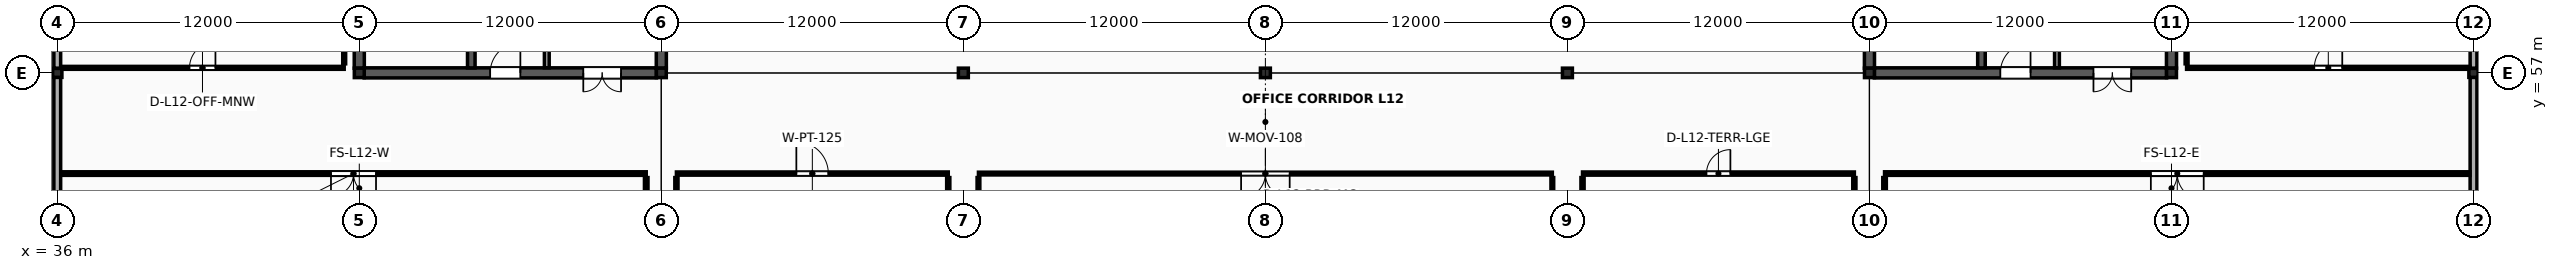
"""IFC4 building model, lengths in metres.
Left out: names, types, materials, properties, quantities, classifications, styles, units other than length and angle.
Written with IfcOpenShell. Run it as: python <this file> out.ifc"""

import sys

from ifc_helpers import new_model, si_unit, direction, frame, frame_2d, origin, origin_2d, place, context, subcontext, project, spatial, rectangle, i_section, extrude, element, fill, save


model = new_model("IFC4")
c1 = context("Model", 3, precision=1e-05, world=origin(), true_north=direction((0.0, 1.0)))
c2 = subcontext(c1, "Body", "Model", "MODEL_VIEW")
j1 = project(units=[si_unit("LENGTHUNIT", "METRE"), si_unit("PLANEANGLEUNIT", "RADIAN")], contexts=[c1])
p1 = place(None, origin())
s1 = spatial("IfcSite", under=j1, at=p1, CompositionType="ELEMENT")
p2 = place(p1, origin())
s2 = spatial("IfcBuilding", under=s1, at=p2, CompositionType="ELEMENT")
p3 = place(p2, frame((0.0, 0.0, 49.6)))
s3 = spatial("IfcBuildingStorey", under=s2, at=p3, CompositionType="ELEMENT", Elevation=49.6)
p4 = place(p3, frame((36.0, 57.0, 0.0), z_axis=(0.0, 0.0, 1.0), x_axis=(1.0, 0.0, 0.0)))
e1 = element("IfcColumn", 1, at=p4, inside=s3, PredefinedType="COLUMN", context=c2, shape_type="SweptSolid", body=[
    extrude(i_section(OverallWidth=0.369, OverallDepth=0.356, WebThickness=0.011, FlangeThickness=0.018, FilletRadius=0.018, at=origin_2d()), origin(), (0.0, 0.0, 1.0), 4.0),
])
for number, where, z_axis, x_axis in (
    (2, (48.0, 57.0, 0.0), (0.0, 0.0, 1.0), (1.0, 0.0, 0.0)),
    (3, (60.0, 57.0, 0.0), (0.0, 0.0, 1.0), (1.0, 0.0, 0.0)),
    (4, (72.0, 57.0, 0.0), (0.0, 0.0, 1.0), (1.0, 0.0, 0.0)),
    (5, (84.0, 57.0, 0.0), (0.0, 0.0, 1.0), (1.0, 0.0, 0.0)),
    (6, (96.0, 57.0, 0.0), (0.0, 0.0, 1.0), (1.0, 0.0, 0.0)),
    (7, (108.0, 57.0, 0.0), (0.0, 0.0, 1.0), (1.0, 0.0, 0.0)),
    (8, (120.0, 57.0, 0.0), (0.0, 0.0, 1.0), (1.0, 0.0, 0.0)),
):
    element("IfcColumn", number, at=place(p3, frame(where, z_axis=z_axis, x_axis=x_axis)), inside=s3, PredefinedType="COLUMN", context=c2, shape_type="SweptSolid", body=[
        extrude(i_section(OverallWidth=0.394, OverallDepth=0.375, WebThickness=0.017, FlangeThickness=0.028, FilletRadius=0.018, at=origin_2d()), origin(), (0.0, 0.0, 1.0), 4.0),
    ])
p5 = place(p3, frame((132.0, 57.0, 0.0), z_axis=(0.0, 0.0, 1.0), x_axis=(1.0, 0.0, 0.0)))
e9 = element("IfcColumn", 9, at=p5, inside=s3, PredefinedType="COLUMN", context=c2, shape_type="SweptSolid", body=[
    extrude(i_section(OverallWidth=0.369, OverallDepth=0.356, WebThickness=0.011, FlangeThickness=0.018, FilletRadius=0.018, at=origin_2d()), origin(), (0.0, 0.0, 1.0), 4.0),
])
p6 = place(p3, frame((48.194, 57.0, 0.0), z_axis=(0.0, 0.0, 1.0), x_axis=(1.0, 0.0, 0.0)))
e10 = element("IfcWall", 10, at=p6, inside=s3, PredefinedType="SHEAR", context=c2, shape_type="SweptSolid", body=[
    extrude(rectangle(XDim=11.612, YDim=0.4, at=frame_2d((5.806, 0.0))), origin(), (0.0, 0.0, 1.0), 3.848),
])
p7 = place(p6, frame((5.006, 0.0, 0.0)))
e11 = element("IfcOpeningElement", 11, at=p7, cuts=e10, PredefinedType="OPENING", context=c2, shape_type="SweptSolid", body=[
    extrude(rectangle(XDim=1.2, YDim=2.2, at=frame_2d((0.6, 1.1))), frame((0.0, 0.215, 0.0), z_axis=(0.0, -1.0, 0.0), x_axis=(1.0, 0.0, 0.0)), (0.0, 0.0, 1.0), 0.43),
])
p8 = place(p6, frame((8.706, 0.0, 0.0)))
e12 = element("IfcOpeningElement", 12, at=p8, cuts=e10, PredefinedType="OPENING", context=c2, shape_type="SweptSolid", body=[
    extrude(rectangle(XDim=1.5, YDim=2.25, at=frame_2d((0.75, 1.125))), frame((0.0, 0.215, 0.0), z_axis=(0.0, -1.0, 0.0), x_axis=(1.0, 0.0, 0.0)), (0.0, 0.0, 1.0), 0.43),
])
for number, where, z_axis, x_axis in (
    (13, (48.0, 57.185, 0.0), (0.0, 0.0, 1.0), (0.0, 1.0, 0.0)),
    (14, (60.0, 57.185, 0.0), (0.0, 0.0, 1.0), (0.0, 1.0, 0.0)),
):
    element("IfcWall", number, at=place(p3, frame(where, z_axis=z_axis, x_axis=x_axis)), inside=s3, PredefinedType="SHEAR", context=c2, shape_type="SweptSolid", body=[
        extrude(rectangle(XDim=11.64, YDim=0.4, at=frame_2d((5.82, 0.0))), origin(), (0.0, 0.0, 1.0), 3.848),
    ])
p9 = place(p3, frame((52.45, 57.197, 0.0), z_axis=(0.0, 0.0, 1.0), x_axis=(0.0, 1.0, 0.0)))
e15 = element("IfcWall", 15, at=p9, inside=s3, PredefinedType="SHEAR", context=c2, shape_type="SweptSolid", body=[
    extrude(rectangle(XDim=11.606, YDim=0.3, at=frame_2d((5.803, 0.0))), origin(), (0.0, 0.0, 1.0), 3.848),
])
p10 = place(p9, frame((0.9, 0.0, 0.0)))
e16 = element("IfcOpeningElement", 16, at=p10, cuts=e15, PredefinedType="OPENING", context=c2, shape_type="SweptSolid", body=[
    extrude(rectangle(XDim=1.1, YDim=2.2, at=frame_2d((0.55, 1.1))), frame((0.0, 0.165, 0.0), z_axis=(0.0, -1.0, 0.0), x_axis=(1.0, 0.0, 0.0)), (0.0, 0.0, 1.0), 0.33),
])
p11 = place(p3, frame((55.45, 57.2, 0.0), z_axis=(0.0, 0.0, 1.0), x_axis=(0.0, 1.0, 0.0)))
e17 = element("IfcWall", 17, at=p11, inside=s3, PredefinedType="SOLIDWALL", context=c2, shape_type="SweptSolid", body=[
    extrude(rectangle(XDim=8.48, YDim=0.19, at=frame_2d((4.24, 0.0))), origin(), (0.0, 0.0, 1.0), 3.838),
])
p12 = place(p11, frame((3.6, 0.0, 0.0)))
e18 = element("IfcOpeningElement", 18, at=p12, cuts=e17, PredefinedType="OPENING", context=c2, shape_type="SweptSolid", body=[
    extrude(rectangle(XDim=1.04, YDim=2.18, at=frame_2d((0.52, 1.09))), frame((0.0, 0.11, 0.0), z_axis=(0.0, -1.0, 0.0), x_axis=(1.0, 0.0, 0.0)), (0.0, 0.0, 1.0), 0.22),
])
p13 = place(p3, frame((108.194, 57.0, 0.0), z_axis=(0.0, 0.0, 1.0), x_axis=(1.0, 0.0, 0.0)))
e19 = element("IfcWall", 19, at=p13, inside=s3, PredefinedType="SHEAR", context=c2, shape_type="SweptSolid", body=[
    extrude(rectangle(XDim=11.612, YDim=0.4, at=frame_2d((5.806, 0.0))), origin(), (0.0, 0.0, 1.0), 3.848),
])
p14 = place(p13, frame((5.006, 0.0, 0.0)))
e20 = element("IfcOpeningElement", 20, at=p14, cuts=e19, PredefinedType="OPENING", context=c2, shape_type="SweptSolid", body=[
    extrude(rectangle(XDim=1.2, YDim=2.2, at=frame_2d((0.6, 1.1))), frame((0.0, 0.215, 0.0), z_axis=(0.0, -1.0, 0.0), x_axis=(1.0, 0.0, 0.0)), (0.0, 0.0, 1.0), 0.43),
])
p15 = place(p13, frame((8.706, 0.0, 0.0)))
e21 = element("IfcOpeningElement", 21, at=p15, cuts=e19, PredefinedType="OPENING", context=c2, shape_type="SweptSolid", body=[
    extrude(rectangle(XDim=1.5, YDim=2.25, at=frame_2d((0.75, 1.125))), frame((0.0, 0.215, 0.0), z_axis=(0.0, -1.0, 0.0), x_axis=(1.0, 0.0, 0.0)), (0.0, 0.0, 1.0), 0.43),
])
for number, where, z_axis, x_axis in (
    (22, (108.0, 57.185, 0.0), (0.0, 0.0, 1.0), (0.0, 1.0, 0.0)),
    (23, (120.0, 57.185, 0.0), (0.0, 0.0, 1.0), (0.0, 1.0, 0.0)),
):
    element("IfcWall", number, at=place(p3, frame(where, z_axis=z_axis, x_axis=x_axis)), inside=s3, PredefinedType="SHEAR", context=c2, shape_type="SweptSolid", body=[
        extrude(rectangle(XDim=11.64, YDim=0.4, at=frame_2d((5.82, 0.0))), origin(), (0.0, 0.0, 1.0), 3.848),
    ])
p16 = place(p3, frame((112.45, 57.197, 0.0), z_axis=(0.0, 0.0, 1.0), x_axis=(0.0, 1.0, 0.0)))
e24 = element("IfcWall", 24, at=p16, inside=s3, PredefinedType="SHEAR", context=c2, shape_type="SweptSolid", body=[
    extrude(rectangle(XDim=11.606, YDim=0.3, at=frame_2d((5.803, 0.0))), origin(), (0.0, 0.0, 1.0), 3.848),
])
p17 = place(p16, frame((0.9, 0.0, 0.0)))
e25 = element("IfcOpeningElement", 25, at=p17, cuts=e24, PredefinedType="OPENING", context=c2, shape_type="SweptSolid", body=[
    extrude(rectangle(XDim=1.1, YDim=2.2, at=frame_2d((0.55, 1.1))), frame((0.0, 0.165, 0.0), z_axis=(0.0, -1.0, 0.0), x_axis=(1.0, 0.0, 0.0)), (0.0, 0.0, 1.0), 0.33),
])
p18 = place(p3, frame((115.45, 57.2, 0.0), z_axis=(0.0, 0.0, 1.0), x_axis=(0.0, 1.0, 0.0)))
e26 = element("IfcWall", 26, at=p18, inside=s3, PredefinedType="SOLIDWALL", context=c2, shape_type="SweptSolid", body=[
    extrude(rectangle(XDim=8.48, YDim=0.19, at=frame_2d((4.24, 0.0))), origin(), (0.0, 0.0, 1.0), 3.838),
])
p19 = place(p18, frame((3.6, 0.0, 0.0)))
e27 = element("IfcOpeningElement", 27, at=p19, cuts=e26, PredefinedType="OPENING", context=c2, shape_type="SweptSolid", body=[
    extrude(rectangle(XDim=1.04, YDim=2.18, at=frame_2d((0.52, 1.09))), frame((0.0, 0.11, 0.0), z_axis=(0.0, -1.0, 0.0), x_axis=(1.0, 0.0, 0.0)), (0.0, 0.0, 1.0), 0.22),
])
p20 = place(p3, frame((36.0, 45.176, 0.0), z_axis=(0.0, 0.0, 1.0), x_axis=(0.0, 1.0, 0.0)))
e28 = element("IfcWall", 28, at=p20, inside=s3, PredefinedType="SOLIDWALL", context=c2, shape_type="SweptSolid", body=[
    extrude(rectangle(XDim=11.648, YDim=0.27, at=frame_2d((5.824, 0.0))), origin(), (0.0, 0.0, 1.0), 3.301),
])
p21 = place(p20, frame((4.904, 0.0, 0.78)))
e29 = element("IfcOpeningElement", 29, at=p21, cuts=e28, PredefinedType="OPENING", context=c2, shape_type="SweptSolid", body=[
    extrude(rectangle(XDim=1.84, YDim=1.42, at=frame_2d((0.92, 0.71))), frame((0.0, 0.15, 0.0), z_axis=(0.0, -1.0, 0.0), x_axis=(1.0, 0.0, 0.0)), (0.0, 0.0, 1.0), 0.3),
])
p22 = place(p3, frame((36.0, 57.176, 0.0), z_axis=(0.0, 0.0, 1.0), x_axis=(0.0, 1.0, 0.0)))
e30 = element("IfcWall", 30, at=p22, inside=s3, PredefinedType="SOLIDWALL", context=c2, shape_type="SweptSolid", body=[
    extrude(rectangle(XDim=11.648, YDim=0.27, at=frame_2d((5.824, 0.0))), origin(), (0.0, 0.0, 1.0), 3.301),
])
p23 = place(p22, frame((4.824, 0.0, 0.78)))
e31 = element("IfcOpeningElement", 31, at=p23, cuts=e30, PredefinedType="OPENING", context=c2, shape_type="SweptSolid", body=[
    extrude(rectangle(XDim=2.0, YDim=1.42, at=frame_2d((1.0, 0.71))), frame((0.0, 0.15, 0.0), z_axis=(0.0, -1.0, 0.0), x_axis=(1.0, 0.0, 0.0)), (0.0, 0.0, 1.0), 0.3),
])
p24 = place(p3, frame((132.0, 45.176, 0.0), z_axis=(0.0, 0.0, 1.0), x_axis=(0.0, 1.0, 0.0)))
e32 = element("IfcWall", 32, at=p24, inside=s3, PredefinedType="SOLIDWALL", context=c2, shape_type="SweptSolid", body=[
    extrude(rectangle(XDim=11.648, YDim=0.27, at=frame_2d((5.824, 0.0))), origin(), (0.0, 0.0, 1.0), 3.301),
])
p25 = place(p24, frame((4.744, 0.0, 0.78)))
e33 = element("IfcOpeningElement", 33, at=p25, cuts=e32, PredefinedType="OPENING", context=c2, shape_type="SweptSolid", body=[
    extrude(rectangle(XDim=2.16, YDim=1.42, at=frame_2d((1.08, 0.71))), frame((0.0, 0.15, 0.0), z_axis=(0.0, -1.0, 0.0), x_axis=(1.0, 0.0, 0.0)), (0.0, 0.0, 1.0), 0.3),
])
p26 = place(p3, frame((132.0, 57.176, 0.0), z_axis=(0.0, 0.0, 1.0), x_axis=(0.0, 1.0, 0.0)))
e34 = element("IfcWall", 34, at=p26, inside=s3, PredefinedType="SOLIDWALL", context=c2, shape_type="SweptSolid", body=[
    extrude(rectangle(XDim=11.648, YDim=0.27, at=frame_2d((5.824, 0.0))), origin(), (0.0, 0.0, 1.0), 3.301),
])
p27 = place(p26, frame((4.664, 0.0, 0.78)))
e35 = element("IfcOpeningElement", 35, at=p27, cuts=e34, PredefinedType="OPENING", context=c2, shape_type="SweptSolid", body=[
    extrude(rectangle(XDim=2.32, YDim=1.42, at=frame_2d((1.16, 0.71))), frame((0.0, 0.15, 0.0), z_axis=(0.0, -1.0, 0.0), x_axis=(1.0, 0.0, 0.0)), (0.0, 0.0, 1.0), 0.3),
])
p28 = place(p3, frame((36.14, 53.0, 0.0), z_axis=(0.0, 0.0, 1.0), x_axis=(1.0, 0.0, 0.0)))
e36 = element("IfcWall", 36, at=p28, inside=s3, PredefinedType="PARTITIONING", context=c2, shape_type="SweptSolid", body=[
    extrude(rectangle(XDim=23.26, YDim=0.14, at=frame_2d((11.63, 0.0))), origin(), (0.0, 0.0, 1.0), 2.88),
])
p29 = place(p28, frame((10.735, 0.0, 0.0)))
e37 = element("IfcOpeningElement", 37, at=p29, cuts=e36, PredefinedType="OPENING", context=c2, shape_type="SweptSolid", body=[
    extrude(rectangle(XDim=1.79, YDim=2.39, at=frame_2d((0.895, 1.195))), frame((0.0, 0.085, 0.0), z_axis=(0.0, -1.0, 0.0), x_axis=(1.0, 0.0, 0.0)), (0.0, 0.0, 1.0), 0.17),
])
p30 = place(p3, frame((59.4, 45.14, 0.0), z_axis=(0.0, 0.0, 1.0), x_axis=(0.0, 1.0, 0.0)))
e38 = element("IfcWall", 38, at=p30, inside=s3, PredefinedType="PARTITIONING", context=c2, shape_type="SweptSolid", body=[
    extrude(rectangle(XDim=7.7, YDim=0.14, at=frame_2d((3.85, 0.0))), origin(), (0.0, 0.0, 1.0), 2.88),
])
p31 = place(p3, frame((60.6, 53.0, 0.0), z_axis=(0.0, 0.0, 1.0), x_axis=(1.0, 0.0, 0.0)))
e39 = element("IfcWall", 39, at=p31, inside=s3, PredefinedType="PARTITIONING", context=c2, shape_type="SweptSolid", body=[
    extrude(rectangle(XDim=10.8, YDim=0.125, at=frame_2d((5.4, 0.0))), origin(), (0.0, 0.0, 1.0), 2.88),
])
p32 = place(p31, frame((4.765, 0.0, 0.0)))
e40 = element("IfcOpeningElement", 40, at=p32, cuts=e39, PredefinedType="OPENING", context=c2, shape_type="SweptSolid", body=[
    extrude(rectangle(XDim=1.27, YDim=2.27, at=frame_2d((0.635, 1.135))), frame((0.0, 0.077, 0.0), z_axis=(0.0, -1.0, 0.0), x_axis=(1.0, 0.0, 0.0)), (0.0, 0.0, 1.0), 0.155),
])
for number, where, z_axis, x_axis in (
    (41, (60.6, 45.14, 0.0), (0.0, 0.0, 1.0), (0.0, 1.0, 0.0)),
    (42, (71.4, 45.14, 0.0), (0.0, 0.0, 1.0), (0.0, 1.0, 0.0)),
):
    element("IfcWall", number, at=place(p3, frame(where, z_axis=z_axis, x_axis=x_axis)), inside=s3, PredefinedType="PARTITIONING", context=c2, shape_type="SweptSolid", body=[
        extrude(rectangle(XDim=7.7, YDim=0.125, at=frame_2d((3.85, 0.0))), origin(), (0.0, 0.0, 1.0), 2.88),
    ])
p33 = place(p3, frame((72.6, 53.0, 0.0), z_axis=(0.0, 0.0, 1.0), x_axis=(1.0, 0.0, 0.0)))
e43 = element("IfcWall", 43, at=p33, inside=s3, PredefinedType="MOVABLE", context=c2, shape_type="SweptSolid", body=[
    extrude(rectangle(XDim=22.8, YDim=0.108, at=frame_2d((11.4, 0.0))), origin(), (0.0, 0.0, 1.0), 2.88),
])
p34 = place(p33, frame((10.435, 0.0, 0.0)))
e44 = element("IfcOpeningElement", 44, at=p34, cuts=e43, PredefinedType="OPENING", context=c2, shape_type="SweptSolid", body=[
    extrude(rectangle(XDim=1.93, YDim=2.43, at=frame_2d((0.965, 1.215))), frame((0.0, 0.069, 0.0), z_axis=(0.0, -1.0, 0.0), x_axis=(1.0, 0.0, 0.0)), (0.0, 0.0, 1.0), 0.138),
])
for number, where, z_axis, x_axis in (
    (45, (72.6, 45.14, 0.0), (0.0, 0.0, 1.0), (0.0, 1.0, 0.0)),
    (46, (95.4, 45.14, 0.0), (0.0, 0.0, 1.0), (0.0, 1.0, 0.0)),
):
    element("IfcWall", number, at=place(p3, frame(where, z_axis=z_axis, x_axis=x_axis)), inside=s3, PredefinedType="MOVABLE", context=c2, shape_type="SweptSolid", body=[
        extrude(rectangle(XDim=7.7, YDim=0.108, at=frame_2d((3.85, 0.0))), origin(), (0.0, 0.0, 1.0), 2.88),
    ])
p35 = place(p3, frame((96.6, 53.0, 0.0), z_axis=(0.0, 0.0, 1.0), x_axis=(1.0, 0.0, 0.0)))
e47 = element("IfcWall", 47, at=p35, inside=s3, PredefinedType="PARTITIONING", context=c2, shape_type="SweptSolid", body=[
    extrude(rectangle(XDim=10.8, YDim=0.125, at=frame_2d((5.4, 0.0))), origin(), (0.0, 0.0, 1.0), 2.88),
])
p36 = place(p35, frame((4.925, 0.0, 0.0)))
e48 = element("IfcOpeningElement", 48, at=p36, cuts=e47, PredefinedType="OPENING", context=c2, shape_type="SweptSolid", body=[
    extrude(rectangle(XDim=0.95, YDim=2.13, at=frame_2d((0.475, 1.065))), frame((0.0, 0.077, 0.0), z_axis=(0.0, -1.0, 0.0), x_axis=(1.0, 0.0, 0.0)), (0.0, 0.0, 1.0), 0.155),
])
for number, where, z_axis, x_axis in (
    (49, (96.6, 45.14, 0.0), (0.0, 0.0, 1.0), (0.0, 1.0, 0.0)),
    (50, (107.4, 45.14, 0.0), (0.0, 0.0, 1.0), (0.0, 1.0, 0.0)),
):
    element("IfcWall", number, at=place(p3, frame(where, z_axis=z_axis, x_axis=x_axis)), inside=s3, PredefinedType="PARTITIONING", context=c2, shape_type="SweptSolid", body=[
        extrude(rectangle(XDim=7.7, YDim=0.125, at=frame_2d((3.85, 0.0))), origin(), (0.0, 0.0, 1.0), 2.88),
    ])
p37 = place(p3, frame((108.6, 53.0, 0.0), z_axis=(0.0, 0.0, 1.0), x_axis=(1.0, 0.0, 0.0)))
e51 = element("IfcWall", 51, at=p37, inside=s3, PredefinedType="PARTITIONING", context=c2, shape_type="SweptSolid", body=[
    extrude(rectangle(XDim=23.26, YDim=0.14, at=frame_2d((11.63, 0.0))), origin(), (0.0, 0.0, 1.0), 2.88),
])
p38 = place(p37, frame((10.58, 0.0, 0.0)))
e52 = element("IfcOpeningElement", 52, at=p38, cuts=e51, PredefinedType="OPENING", context=c2, shape_type="SweptSolid", body=[
    extrude(rectangle(XDim=2.1, YDim=2.47, at=frame_2d((1.05, 1.235))), frame((0.0, 0.085, 0.0), z_axis=(0.0, -1.0, 0.0), x_axis=(1.0, 0.0, 0.0)), (0.0, 0.0, 1.0), 0.17),
])
p39 = place(p3, frame((108.6, 45.14, 0.0), z_axis=(0.0, 0.0, 1.0), x_axis=(0.0, 1.0, 0.0)))
e53 = element("IfcWall", 53, at=p39, inside=s3, PredefinedType="PARTITIONING", context=c2, shape_type="SweptSolid", body=[
    extrude(rectangle(XDim=7.7, YDim=0.14, at=frame_2d((3.85, 0.0))), origin(), (0.0, 0.0, 1.0), 2.88),
])
p40 = place(p3, frame((36.14, 57.2, 0.0), z_axis=(0.0, 0.0, 1.0), x_axis=(1.0, 0.0, 0.0)))
e54 = element("IfcWall", 54, at=p40, inside=s3, PredefinedType="PARTITIONING", context=c2, shape_type="SweptSolid", body=[
    extrude(rectangle(XDim=11.26, YDim=0.115, at=frame_2d((5.63, 0.0))), origin(), (0.0, 0.0, 1.0), 2.88),
])
p41 = place(p40, frame((5.115, 0.0, 0.0)))
e55 = element("IfcOpeningElement", 55, at=p41, cuts=e54, PredefinedType="OPENING", context=c2, shape_type="SweptSolid", body=[
    extrude(rectangle(XDim=1.03, YDim=2.17, at=frame_2d((0.515, 1.085))), frame((0.0, 0.073, 0.0), z_axis=(0.0, -1.0, 0.0), x_axis=(1.0, 0.0, 0.0)), (0.0, 0.0, 1.0), 0.145),
])
p42 = place(p3, frame((47.4, 57.36, 0.0), z_axis=(0.0, 0.0, 1.0), x_axis=(0.0, 1.0, 0.0)))
e56 = element("IfcWall", 56, at=p42, inside=s3, PredefinedType="PARTITIONING", context=c2, shape_type="SweptSolid", body=[
    extrude(rectangle(XDim=11.5, YDim=0.115, at=frame_2d((5.75, 0.0))), origin(), (0.0, 0.0, 1.0), 2.88),
])
p43 = place(p3, frame((120.6, 57.2, 0.0), z_axis=(0.0, 0.0, 1.0), x_axis=(1.0, 0.0, 0.0)))
e57 = element("IfcWall", 57, at=p43, inside=s3, PredefinedType="PARTITIONING", context=c2, shape_type="SweptSolid", body=[
    extrude(rectangle(XDim=11.26, YDim=0.115, at=frame_2d((5.63, 0.0))), origin(), (0.0, 0.0, 1.0), 2.88),
])
p44 = place(p43, frame((5.075, 0.0, 0.0)))
e58 = element("IfcOpeningElement", 58, at=p44, cuts=e57, PredefinedType="OPENING", context=c2, shape_type="SweptSolid", body=[
    extrude(rectangle(XDim=1.11, YDim=2.21, at=frame_2d((0.555, 1.105))), frame((0.0, 0.073, 0.0), z_axis=(0.0, -1.0, 0.0), x_axis=(1.0, 0.0, 0.0)), (0.0, 0.0, 1.0), 0.145),
])
p45 = place(p3, frame((120.6, 57.36, 0.0), z_axis=(0.0, 0.0, 1.0), x_axis=(0.0, 1.0, 0.0)))
e59 = element("IfcWall", 59, at=p45, inside=s3, PredefinedType="PARTITIONING", context=c2, shape_type="SweptSolid", body=[
    extrude(rectangle(XDim=11.5, YDim=0.115, at=frame_2d((5.75, 0.0))), origin(), (0.0, 0.0, 1.0), 2.88),
])
p46 = place(p7, origin())
e60 = element("IfcDoor", 60, at=p46, inside=s3, OperationType="SINGLE_SWING_RIGHT", PredefinedType="DOOR", context=c2, shape_type="SweptSolid", body=[
    extrude(rectangle(XDim=1.2, YDim=2.2, at=frame_2d((0.6, 1.1))), frame((0.0, 0.025, 0.0), z_axis=(0.0, -1.0, 0.0), x_axis=(1.0, 0.0, 0.0)), (0.0, 0.0, 1.0), 0.05),
])
fill(e11, e60)
p47 = place(p8, origin())
e61 = element("IfcDoor", 61, at=p47, inside=s3, OperationType="DOUBLE_DOOR_SINGLE_SWING", PredefinedType="DOOR", context=c2, shape_type="SweptSolid", body=[
    extrude(rectangle(XDim=1.5, YDim=2.25, at=frame_2d((0.75, 1.125))), frame((0.0, 0.025, 0.0), z_axis=(0.0, -1.0, 0.0), x_axis=(1.0, 0.0, 0.0)), (0.0, 0.0, 1.0), 0.05),
])
fill(e12, e61)
p48 = place(p14, origin())
e62 = element("IfcDoor", 62, at=p48, inside=s3, OperationType="SINGLE_SWING_RIGHT", PredefinedType="DOOR", context=c2, shape_type="SweptSolid", body=[
    extrude(rectangle(XDim=1.2, YDim=2.2, at=frame_2d((0.6, 1.1))), frame((0.0, 0.025, 0.0), z_axis=(0.0, -1.0, 0.0), x_axis=(1.0, 0.0, 0.0)), (0.0, 0.0, 1.0), 0.05),
])
fill(e20, e62)
p49 = place(p15, origin())
e63 = element("IfcDoor", 63, at=p49, inside=s3, OperationType="DOUBLE_DOOR_SINGLE_SWING", PredefinedType="DOOR", context=c2, shape_type="SweptSolid", body=[
    extrude(rectangle(XDim=1.5, YDim=2.25, at=frame_2d((0.75, 1.125))), frame((0.0, 0.025, 0.0), z_axis=(0.0, -1.0, 0.0), x_axis=(1.0, 0.0, 0.0)), (0.0, 0.0, 1.0), 0.05),
])
fill(e21, e63)
p50 = place(p29, origin())
e64 = element("IfcDoor", 64, at=p50, inside=s3, OperationType="DOUBLE_DOOR_SINGLE_SWING", PredefinedType="DOOR", context=c2, shape_type="SweptSolid", body=[
    extrude(rectangle(XDim=1.79, YDim=2.39, at=frame_2d((0.895, 1.195))), frame((0.0, 0.025, 0.0), z_axis=(0.0, -1.0, 0.0), x_axis=(1.0, 0.0, 0.0)), (0.0, 0.0, 1.0), 0.05),
])
fill(e37, e64)
p51 = place(p32, origin())
e65 = element("IfcDoor", 65, at=p51, inside=s3, OperationType="SINGLE_SWING_LEFT", PredefinedType="DOOR", context=c2, shape_type="SweptSolid", body=[
    extrude(rectangle(XDim=1.27, YDim=2.27, at=frame_2d((0.635, 1.135))), frame((0.0, 0.025, 0.0), z_axis=(0.0, -1.0, 0.0), x_axis=(1.0, 0.0, 0.0)), (0.0, 0.0, 1.0), 0.05),
])
fill(e40, e65)
p52 = place(p34, origin())
e66 = element("IfcDoor", 66, at=p52, inside=s3, OperationType="DOUBLE_DOOR_SINGLE_SWING", PredefinedType="DOOR", context=c2, shape_type="SweptSolid", body=[
    extrude(rectangle(XDim=1.93, YDim=2.43, at=frame_2d((0.965, 1.215))), frame((0.0, 0.025, 0.0), z_axis=(0.0, -1.0, 0.0), x_axis=(1.0, 0.0, 0.0)), (0.0, 0.0, 1.0), 0.05),
])
fill(e44, e66)
p53 = place(p36, origin())
e67 = element("IfcDoor", 67, at=p53, inside=s3, OperationType="SINGLE_SWING_RIGHT", PredefinedType="DOOR", context=c2, shape_type="SweptSolid", body=[
    extrude(rectangle(XDim=0.95, YDim=2.13, at=frame_2d((0.475, 1.065))), frame((0.0, 0.025, 0.0), z_axis=(0.0, -1.0, 0.0), x_axis=(1.0, 0.0, 0.0)), (0.0, 0.0, 1.0), 0.05),
])
fill(e48, e67)
p54 = place(p38, origin())
e68 = element("IfcDoor", 68, at=p54, inside=s3, OperationType="DOUBLE_DOOR_SINGLE_SWING", PredefinedType="DOOR", context=c2, shape_type="SweptSolid", body=[
    extrude(rectangle(XDim=2.1, YDim=2.47, at=frame_2d((1.05, 1.235))), frame((0.0, 0.025, 0.0), z_axis=(0.0, -1.0, 0.0), x_axis=(1.0, 0.0, 0.0)), (0.0, 0.0, 1.0), 0.05),
])
fill(e52, e68)
p55 = place(p41, origin())
e69 = element("IfcDoor", 69, at=p55, inside=s3, OperationType="SINGLE_SWING_RIGHT", PredefinedType="DOOR", context=c2, shape_type="SweptSolid", body=[
    extrude(rectangle(XDim=1.03, YDim=2.17, at=frame_2d((0.515, 1.085))), frame((0.0, 0.025, 0.0), z_axis=(0.0, -1.0, 0.0), x_axis=(1.0, 0.0, 0.0)), (0.0, 0.0, 1.0), 0.05),
])
fill(e55, e69)
p56 = place(p44, origin())
e70 = element("IfcDoor", 70, at=p56, inside=s3, OperationType="SINGLE_SWING_RIGHT", PredefinedType="DOOR", context=c2, shape_type="SweptSolid", body=[
    extrude(rectangle(XDim=1.11, YDim=2.21, at=frame_2d((0.555, 1.105))), frame((0.0, 0.025, 0.0), z_axis=(0.0, -1.0, 0.0), x_axis=(1.0, 0.0, 0.0)), (0.0, 0.0, 1.0), 0.05),
])
fill(e58, e70)
save(model, sys.argv[1])
